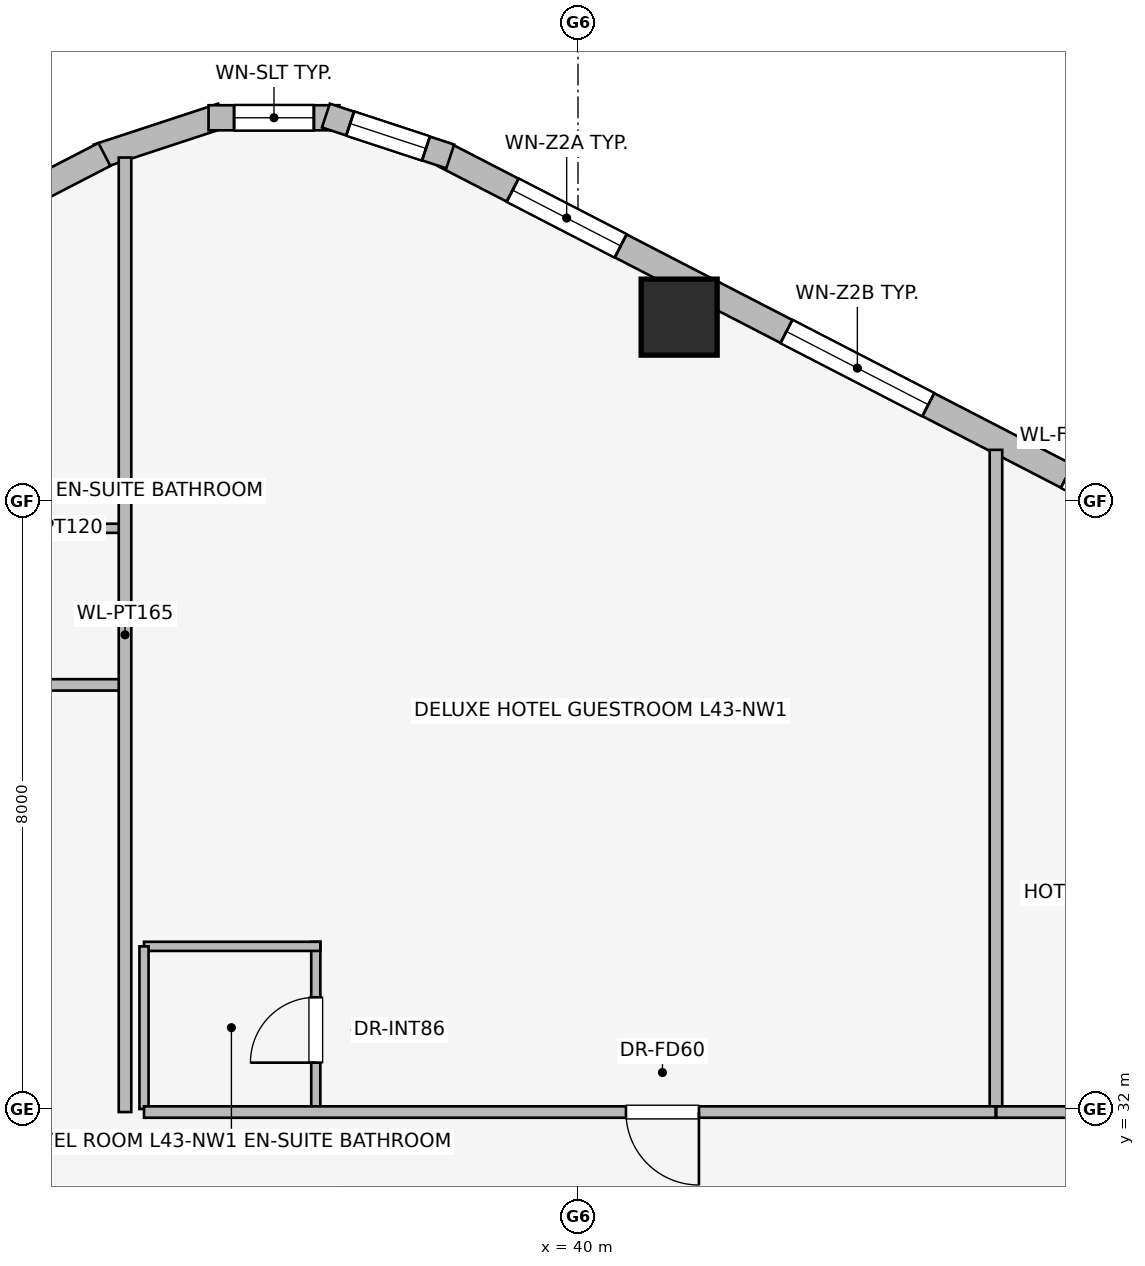
"""IFC4 building model, lengths in metres.
Left out: names, types, materials, properties, quantities, classifications, styles, units other than length and angle.
Written with IfcOpenShell. Run it as: python <this file> out.ifc"""

import sys

from ifc_helpers import new_model, si_unit, direction, frame, frame_2d, origin, origin_2d, place, context, subcontext, project, spatial, rectangle, extrude, element, fill, save


model = new_model("IFC4")
c1 = context("Model", 3, precision=1e-05, world=origin(), true_north=direction((0.0, 1.0)))
c2 = subcontext(c1, "Body", "Model", "MODEL_VIEW")
j1 = project(units=[si_unit("LENGTHUNIT", "METRE"), si_unit("PLANEANGLEUNIT", "RADIAN")], contexts=[c1])
p1 = place(None, origin())
s1 = spatial("IfcSite", under=j1, at=p1, CompositionType="ELEMENT")
p2 = place(p1, origin())
s2 = spatial("IfcBuilding", under=s1, at=p2, CompositionType="ELEMENT")
p3 = place(p2, frame((0.0, 0.0, 160.2)))
s3 = spatial("IfcBuildingStorey", under=s2, at=p3, CompositionType="ELEMENT", Elevation=160.2)
p4 = place(p3, frame((41.331, 42.418, 0.0), z_axis=(0.0, 0.0, 1.0), x_axis=(1.0, 0.0, 0.0)))
e1 = element("IfcColumn", 1, at=p4, inside=s3, PredefinedType="COLUMN", context=c2, shape_type="SweptSolid", body=[
    extrude(rectangle(XDim=1.0, YDim=1.0, at=origin_2d()), origin(), (0.0, 0.0, 1.0), 3.45),
])
p5 = place(p3, frame((38.231, 44.558, 0.0), z_axis=(0.0, 0.0, 1.0), x_axis=(0.888613612362, -0.458656568606, 0.0)))
e2 = element("IfcWall", 2, at=p5, inside=s3, PredefinedType="STANDARD", context=c2, shape_type="SweptSolid", body=[
    extrude(rectangle(XDim=18.681, YDim=0.34, at=frame_2d((9.34, 0.0))), origin(), (0.0, 0.0, 1.0), 3.03),
])
p6 = place(p5, frame((1.023, 0.0, 0.75)))
e3 = element("IfcOpeningElement", 3, at=p6, cuts=e2, PredefinedType="OPENING", context=c2, shape_type="SweptSolid", body=[
    extrude(rectangle(XDim=1.6, YDim=1.55, at=frame_2d((0.8, 0.775))), frame((0.0, 0.18, 0.0), z_axis=(0.0, -1.0, 0.0), x_axis=(1.0, 0.0, 0.0)), (0.0, 0.0, 1.0), 0.36),
])
p7 = place(p5, frame((5.077, 0.0, 0.75)))
e4 = element("IfcOpeningElement", 4, at=p7, cuts=e2, PredefinedType="OPENING", context=c2, shape_type="SweptSolid", body=[
    extrude(rectangle(XDim=2.1, YDim=1.5, at=frame_2d((1.05, 0.75))), frame((0.0, 0.18, 0.0), z_axis=(0.0, -1.0, 0.0), x_axis=(1.0, 0.0, 0.0)), (0.0, 0.0, 1.0), 0.36),
])
p8 = place(p5, frame((9.229, 0.0, 0.75)))
e5 = element("IfcOpeningElement", 5, at=p8, cuts=e2, PredefinedType="OPENING", context=c2, shape_type="SweptSolid", body=[
    extrude(rectangle(XDim=1.6, YDim=1.55, at=frame_2d((0.8, 0.775))), frame((0.0, 0.18, 0.0), z_axis=(0.0, -1.0, 0.0), x_axis=(1.0, 0.0, 0.0)), (0.0, 0.0, 1.0), 0.36),
])
p9 = place(p5, frame((12.079, 0.0, 0.75)))
e6 = element("IfcOpeningElement", 6, at=p9, cuts=e2, PredefinedType="OPENING", context=c2, shape_type="SweptSolid", body=[
    extrude(rectangle(XDim=1.6, YDim=1.55, at=frame_2d((0.8, 0.775))), frame((0.0, 0.18, 0.0), z_axis=(0.0, -1.0, 0.0), x_axis=(1.0, 0.0, 0.0)), (0.0, 0.0, 1.0), 0.36),
])
p10 = place(p5, frame((15.808, 0.0, 0.75)))
e7 = element("IfcOpeningElement", 7, at=p10, cuts=e2, PredefinedType="OPENING", context=c2, shape_type="SweptSolid", body=[
    extrude(rectangle(XDim=2.1, YDim=1.5, at=frame_2d((1.05, 0.75))), frame((0.0, 0.18, 0.0), z_axis=(0.0, -1.0, 0.0), x_axis=(1.0, 0.0, 0.0)), (0.0, 0.0, 1.0), 0.36),
])
p11 = place(p3, frame((33.681, 44.532, 0.0), z_axis=(0.0, 0.0, 1.0), x_axis=(0.949937416267, 0.312440242569, 0.0)))
e8 = element("IfcWall", 8, at=p11, inside=s3, PredefinedType="STANDARD", context=c2, shape_type="SweptSolid", body=[
    extrude(rectangle(XDim=1.722, YDim=0.33, at=frame_2d((0.861, 0.0))), origin(), (0.0, 0.0, 1.0), 3.03),
])
p12 = place(p3, frame((35.139, 45.041, 0.0), z_axis=(0.0, 0.0, 1.0), x_axis=(1.0, 0.0, 0.0)))
e9 = element("IfcWall", 9, at=p12, inside=s3, PredefinedType="STANDARD", context=c2, shape_type="SweptSolid", body=[
    extrude(rectangle(XDim=1.722, YDim=0.33, at=frame_2d((0.861, 0.0))), origin(), (0.0, 0.0, 1.0), 3.03),
])
p13 = place(p12, frame((0.336, 0.0, 0.75)))
e10 = element("IfcOpeningElement", 10, at=p13, cuts=e9, PredefinedType="OPENING", context=c2, shape_type="SweptSolid", body=[
    extrude(rectangle(XDim=1.05, YDim=1.4, at=frame_2d((0.525, 0.7))), frame((0.0, 0.175, 0.0), z_axis=(0.0, -1.0, 0.0), x_axis=(1.0, 0.0, 0.0)), (0.0, 0.0, 1.0), 0.35),
])
p14 = place(p3, frame((36.683, 45.07, 0.0), z_axis=(0.0, 0.0, 1.0), x_axis=(0.949937416267, -0.312440242569, 0.0)))
e11 = element("IfcWall", 11, at=p14, inside=s3, PredefinedType="STANDARD", context=c2, shape_type="SweptSolid", body=[
    extrude(rectangle(XDim=1.722, YDim=0.33, at=frame_2d((0.861, 0.0))), origin(), (0.0, 0.0, 1.0), 3.03),
])
p15 = place(p14, frame((0.336, 0.0, 0.75)))
e12 = element("IfcOpeningElement", 12, at=p15, cuts=e11, PredefinedType="OPENING", context=c2, shape_type="SweptSolid", body=[
    extrude(rectangle(XDim=1.05, YDim=1.4, at=frame_2d((0.525, 0.7))), frame((0.0, 0.175, 0.0), z_axis=(0.0, -1.0, 0.0), x_axis=(1.0, 0.0, 0.0)), (0.0, 0.0, 1.0), 0.35),
])
p16 = place(p3, frame((17.169, 35.99, 0.0), z_axis=(0.0, 0.0, 1.0), x_axis=(0.888613612362, 0.458656568606, 0.0)))
e13 = element("IfcWall", 13, at=p16, inside=s3, PredefinedType="STANDARD", context=c2, shape_type="SweptSolid", body=[
    extrude(rectangle(XDim=18.681, YDim=0.34, at=frame_2d((9.34, 0.0))), origin(), (0.0, 0.0, 1.0), 3.03),
])
p17 = place(p16, frame((1.023, 0.0, 0.75)))
e14 = element("IfcOpeningElement", 14, at=p17, cuts=e13, PredefinedType="OPENING", context=c2, shape_type="SweptSolid", body=[
    extrude(rectangle(XDim=1.6, YDim=1.55, at=frame_2d((0.8, 0.775))), frame((0.0, 0.18, 0.0), z_axis=(0.0, -1.0, 0.0), x_axis=(1.0, 0.0, 0.0)), (0.0, 0.0, 1.0), 0.36),
])
p18 = place(p16, frame((4.981, 0.0, 0.75)))
e15 = element("IfcOpeningElement", 15, at=p18, cuts=e13, PredefinedType="OPENING", context=c2, shape_type="SweptSolid", body=[
    extrude(rectangle(XDim=2.1, YDim=1.5, at=frame_2d((1.05, 0.75))), frame((0.0, 0.18, 0.0), z_axis=(0.0, -1.0, 0.0), x_axis=(1.0, 0.0, 0.0)), (0.0, 0.0, 1.0), 0.36),
])
p19 = place(p16, frame((8.29, 0.0, 0.75)))
e16 = element("IfcOpeningElement", 16, at=p19, cuts=e13, PredefinedType="OPENING", context=c2, shape_type="SweptSolid", body=[
    extrude(rectangle(XDim=2.1, YDim=1.5, at=frame_2d((1.05, 0.75))), frame((0.0, 0.18, 0.0), z_axis=(0.0, -1.0, 0.0), x_axis=(1.0, 0.0, 0.0)), (0.0, 0.0, 1.0), 0.36),
])
p20 = place(p16, frame((11.6, 0.0, 0.75)))
e17 = element("IfcOpeningElement", 17, at=p20, cuts=e13, PredefinedType="OPENING", context=c2, shape_type="SweptSolid", body=[
    extrude(rectangle(XDim=2.1, YDim=1.5, at=frame_2d((1.05, 0.75))), frame((0.0, 0.18, 0.0), z_axis=(0.0, -1.0, 0.0), x_axis=(1.0, 0.0, 0.0)), (0.0, 0.0, 1.0), 0.36),
])
p21 = place(p16, frame((16.058, 0.0, 0.75)))
e18 = element("IfcOpeningElement", 18, at=p21, cuts=e13, PredefinedType="OPENING", context=c2, shape_type="SweptSolid", body=[
    extrude(rectangle(XDim=1.6, YDim=1.55, at=frame_2d((0.8, 0.775))), frame((0.0, 0.18, 0.0), z_axis=(0.0, -1.0, 0.0), x_axis=(1.0, 0.0, 0.0)), (0.0, 0.0, 1.0), 0.36),
])
p22 = place(p3, frame((34.0, 39.64, 0.0), z_axis=(0.0, 0.0, 1.0), x_axis=(-1.0, 0.0, 0.0)))
e19 = element("IfcWall", 19, at=p22, inside=s3, PredefinedType="PARTITIONING", context=c2, shape_type="SweptSolid", body=[
    extrude(rectangle(XDim=2.34, YDim=0.12, at=frame_2d((1.17, 0.0))), origin(), (0.0, 0.0, 1.0), 3.03),
])
p23 = place(p3, frame((34.0, 37.58, 0.0), z_axis=(0.0, 0.0, 1.0), x_axis=(-1.0, 0.0, 0.0)))
e20 = element("IfcWall", 20, at=p23, inside=s3, PredefinedType="PARTITIONING", context=c2, shape_type="SweptSolid", body=[
    extrude(rectangle(XDim=13.707, YDim=0.15, at=frame_2d((6.854, 0.0))), origin(), (0.0, 0.0, 1.0), 2.422),
])
p24 = place(p23, frame((3.37, 0.0, 0.0)))
e21 = element("IfcOpeningElement", 21, at=p24, cuts=e20, PredefinedType="OPENING", context=c2, shape_type="SweptSolid", body=[
    extrude(rectangle(XDim=0.96, YDim=2.0, at=frame_2d((0.48, 1.0))), frame((0.0, 0.085, 0.0), z_axis=(0.0, -1.0, 0.0), x_axis=(1.0, 0.0, 0.0)), (0.0, 0.0, 1.0), 0.17),
])
p25 = place(p3, frame((34.04, 31.96, 0.0), z_axis=(0.0, 0.0, 1.0), x_axis=(0.0, 1.0, 0.0)))
e22 = element("IfcWall", 22, at=p25, inside=s3, PredefinedType="PARTITIONING", context=c2, shape_type="SweptSolid", body=[
    extrude(rectangle(XDim=12.558, YDim=0.165, at=frame_2d((6.279, 0.0))), origin(), (0.0, 0.0, 1.0), 3.03),
])
p26 = place(p3, frame((45.499, 31.97, 0.0), z_axis=(0.0, 0.0, 1.0), x_axis=(0.0, 1.0, 0.0)))
e23 = element("IfcWall", 23, at=p26, inside=s3, PredefinedType="PARTITIONING", context=c2, shape_type="SweptSolid", body=[
    extrude(rectangle(XDim=8.702, YDim=0.165, at=frame_2d((4.351, 0.0))), origin(), (0.0, 0.0, 1.0), 3.03),
])
p27 = place(p3, frame((36.55, 31.96, 0.0), z_axis=(0.0, 0.0, 1.0), x_axis=(0.0, 1.0, 0.0)))
e24 = element("IfcWall", 24, at=p27, inside=s3, PredefinedType="PARTITIONING", context=c2, shape_type="SweptSolid", body=[
    extrude(rectangle(XDim=2.24, YDim=0.12, at=frame_2d((1.12, 0.0))), origin(), (0.0, 0.0, 1.0), 3.03),
])
p28 = place(p27, frame((0.65, 0.0, 0.0)))
e25 = element("IfcOpeningElement", 25, at=p28, cuts=e24, PredefinedType="OPENING", context=c2, shape_type="SweptSolid", body=[
    extrude(rectangle(XDim=0.86, YDim=2.0, at=frame_2d((0.43, 1.0))), frame((0.0, 0.07, 0.0), z_axis=(0.0, -1.0, 0.0), x_axis=(1.0, 0.0, 0.0)), (0.0, 0.0, 1.0), 0.14),
])
p29 = place(p3, frame((36.61, 34.14, 0.0), z_axis=(0.0, 0.0, 1.0), x_axis=(-1.0, 0.0, 0.0)))
e26 = element("IfcWall", 26, at=p29, inside=s3, PredefinedType="PARTITIONING", context=c2, shape_type="SweptSolid", body=[
    extrude(rectangle(XDim=2.32, YDim=0.12, at=frame_2d((1.16, 0.0))), origin(), (0.0, 0.0, 1.0), 3.03),
])
p30 = place(p3, frame((34.29, 34.14, 0.0), z_axis=(0.0, 0.0, 1.0), x_axis=(0.0, -1.0, 0.0)))
e27 = element("IfcWall", 27, at=p30, inside=s3, PredefinedType="PARTITIONING", context=c2, shape_type="SweptSolid", body=[
    extrude(rectangle(XDim=2.14, YDim=0.12, at=frame_2d((1.07, 0.0))), origin(), (0.0, 0.0, 1.0), 3.03),
])
p31 = place(p3, frame((45.494, 31.96, 0.0), z_axis=(0.0, 0.0, 1.0), x_axis=(-1.0, 0.0, 0.0)))
e28 = element("IfcWall", 28, at=p31, inside=s3, PredefinedType="PARTITIONING", context=c2, shape_type="SweptSolid", body=[
    extrude(rectangle(XDim=11.204, YDim=0.15, at=frame_2d((5.602, 0.0))), origin(), (0.0, 0.0, 1.0), 3.03),
])
p32 = place(p31, frame((3.903, 0.0, 0.0)))
e29 = element("IfcOpeningElement", 29, at=p32, cuts=e28, PredefinedType="OPENING", context=c2, shape_type="SweptSolid", body=[
    extrude(rectangle(XDim=0.96, YDim=2.0, at=frame_2d((0.48, 1.0))), frame((0.0, 0.085, 0.0), z_axis=(0.0, -1.0, 0.0), x_axis=(1.0, 0.0, 0.0)), (0.0, 0.0, 1.0), 0.17),
])
p33 = place(p3, frame((56.987, 31.96, 0.0), z_axis=(0.0, 0.0, 1.0), x_axis=(-1.0, 0.0, 0.0)))
e30 = element("IfcWall", 30, at=p33, inside=s3, PredefinedType="PARTITIONING", context=c2, shape_type="SweptSolid", body=[
    extrude(rectangle(XDim=11.483, YDim=0.15, at=frame_2d((5.742, 0.0))), origin(), (0.0, 0.0, 1.0), 3.03),
])
p34 = place(p33, frame((5.381, 0.0, 0.0)))
e31 = element("IfcOpeningElement", 31, at=p34, cuts=e30, PredefinedType="OPENING", context=c2, shape_type="SweptSolid", body=[
    extrude(rectangle(XDim=0.96, YDim=2.0, at=frame_2d((0.48, 1.0))), frame((0.0, 0.085, 0.0), z_axis=(0.0, -1.0, 0.0), x_axis=(1.0, 0.0, 0.0)), (0.0, 0.0, 1.0), 0.17),
])
p35 = place(p6, origin())
e32 = element("IfcWindow", 32, at=p35, inside=s3, PartitioningType="SINGLE_PANEL", PredefinedType="WINDOW", context=c2, shape_type="SweptSolid", body=[
    extrude(rectangle(XDim=1.6, YDim=1.55, at=frame_2d((0.8, 0.775))), frame((0.0, 0.03, 0.0), z_axis=(0.0, -1.0, 0.0), x_axis=(1.0, 0.0, 0.0)), (0.0, 0.0, 1.0), 0.06),
])
fill(e3, e32)
p36 = place(p7, origin())
e33 = element("IfcWindow", 33, at=p36, inside=s3, PartitioningType="SINGLE_PANEL", PredefinedType="WINDOW", context=c2, shape_type="SweptSolid", body=[
    extrude(rectangle(XDim=2.1, YDim=1.5, at=frame_2d((1.05, 0.75))), frame((0.0, 0.03, 0.0), z_axis=(0.0, -1.0, 0.0), x_axis=(1.0, 0.0, 0.0)), (0.0, 0.0, 1.0), 0.06),
])
fill(e4, e33)
p37 = place(p13, origin())
e34 = element("IfcWindow", 34, at=p37, inside=s3, PartitioningType="SINGLE_PANEL", PredefinedType="WINDOW", context=c2, shape_type="SweptSolid", body=[
    extrude(rectangle(XDim=1.05, YDim=1.4, at=frame_2d((0.525, 0.7))), frame((0.0, 0.03, 0.0), z_axis=(0.0, -1.0, 0.0), x_axis=(1.0, 0.0, 0.0)), (0.0, 0.0, 1.0), 0.06),
])
fill(e10, e34)
p38 = place(p15, origin())
e35 = element("IfcWindow", 35, at=p38, inside=s3, PartitioningType="SINGLE_PANEL", PredefinedType="WINDOW", context=c2, shape_type="SweptSolid", body=[
    extrude(rectangle(XDim=1.05, YDim=1.4, at=frame_2d((0.525, 0.7))), frame((0.0, 0.03, 0.0), z_axis=(0.0, -1.0, 0.0), x_axis=(1.0, 0.0, 0.0)), (0.0, 0.0, 1.0), 0.06),
])
fill(e12, e35)
p39 = place(p28, origin())
e36 = element("IfcDoor", 36, at=p39, inside=s3, OperationType="SINGLE_SWING_LEFT", PredefinedType="DOOR", context=c2, shape_type="SweptSolid", body=[
    extrude(rectangle(XDim=0.86, YDim=2.0, at=frame_2d((0.43, 1.0))), frame((0.0, 0.025, 0.0), z_axis=(0.0, -1.0, 0.0), x_axis=(1.0, 0.0, 0.0)), (0.0, 0.0, 1.0), 0.05),
])
fill(e25, e36)
p40 = place(p32, origin())
e37 = element("IfcDoor", 37, at=p40, inside=s3, OperationType="SINGLE_SWING_LEFT", PredefinedType="DOOR", context=c2, shape_type="SweptSolid", body=[
    extrude(rectangle(XDim=0.96, YDim=2.0, at=frame_2d((0.48, 1.0))), frame((0.0, 0.025, 0.0), z_axis=(0.0, -1.0, 0.0), x_axis=(1.0, 0.0, 0.0)), (0.0, 0.0, 1.0), 0.05),
])
fill(e29, e37)
save(model, sys.argv[1])
